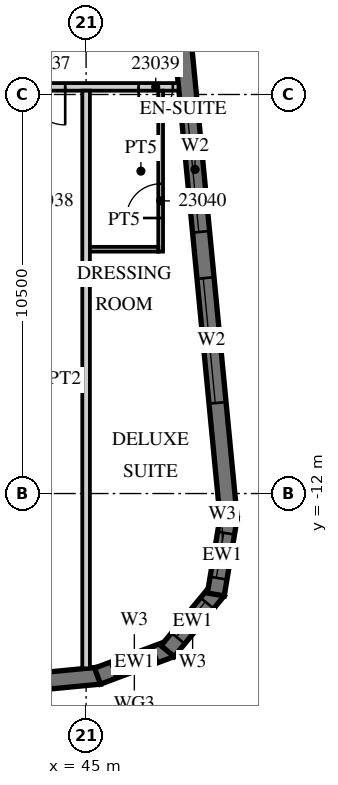
"""IFC4 building model, lengths in metres.
Left out: names, types, materials, properties, quantities, classifications, styles, units other than length and angle.
Written with IfcOpenShell. Run it as: python <this file> out.ifc"""

import sys

from ifc_helpers import new_model, si_unit, direction, frame, frame_2d, origin, place, context, subcontext, project, spatial, polyline, rectangle, outline, extrude, element, fill, save


model = new_model("IFC4")
c1 = context("Model", 3, precision=1e-05, world=origin(), true_north=direction((0.0, 1.0)))
c2 = subcontext(c1, "Body", "Model", "MODEL_VIEW")
j1 = project(units=[si_unit("LENGTHUNIT", "METRE"), si_unit("PLANEANGLEUNIT", "RADIAN")], contexts=[c1])
p1 = place(None, origin())
s1 = spatial("IfcSite", under=j1, at=p1, CompositionType="ELEMENT")
p2 = place(p1, origin())
s2 = spatial("IfcBuilding", under=s1, at=p2, CompositionType="ELEMENT")
p3 = place(p2, frame((0.0, 0.0, 110.8)))
s3 = spatial("IfcBuildingStorey", under=s2, at=p3, CompositionType="ELEMENT", Elevation=110.8)
p4 = place(p3, frame((-13.521, -22.46, 0.0), z_axis=(0.0, 0.0, 1.0), x_axis=(0.995396096335, 0.095846812164, 0.0)))
e1 = element("IfcWall", 1, at=p4, inside=s3, PredefinedType="SOLIDWALL", context=c2, shape_type="SweptSolid", body=[
    extrude(rectangle(XDim=59.151, YDim=0.45, at=frame_2d((29.575, 0.0))), origin(), (0.0, 0.0, 1.0), 3.02),
])
p5 = place(p4, frame((0.91, 0.0, 0.45)))
e2 = element("IfcOpeningElement", 2, at=p5, cuts=e1, PredefinedType="OPENING", context=c2, shape_type="SweptSolid", body=[
    extrude(rectangle(XDim=2.7, YDim=2.25, at=frame_2d((1.35, 1.125))), frame((0.0, 0.235, 0.0), z_axis=(0.0, -1.0, 0.0), x_axis=(1.0, 0.0, 0.0)), (0.0, 0.0, 1.0), 0.47),
])
p6 = place(p4, frame((5.431, 0.0, 0.45)))
e3 = element("IfcOpeningElement", 3, at=p6, cuts=e1, PredefinedType="OPENING", context=c2, shape_type="SweptSolid", body=[
    extrude(rectangle(XDim=2.7, YDim=2.25, at=frame_2d((1.35, 1.125))), frame((0.0, 0.235, 0.0), z_axis=(0.0, -1.0, 0.0), x_axis=(1.0, 0.0, 0.0)), (0.0, 0.0, 1.0), 0.47),
])
p7 = place(p4, frame((9.952, 0.0, 0.45)))
e4 = element("IfcOpeningElement", 4, at=p7, cuts=e1, PredefinedType="OPENING", context=c2, shape_type="SweptSolid", body=[
    extrude(rectangle(XDim=2.7, YDim=2.25, at=frame_2d((1.35, 1.125))), frame((0.0, 0.235, 0.0), z_axis=(0.0, -1.0, 0.0), x_axis=(1.0, 0.0, 0.0)), (0.0, 0.0, 1.0), 0.47),
])
p8 = place(p4, frame((14.473, 0.0, 0.45)))
e5 = element("IfcOpeningElement", 5, at=p8, cuts=e1, PredefinedType="OPENING", context=c2, shape_type="SweptSolid", body=[
    extrude(rectangle(XDim=2.7, YDim=2.25, at=frame_2d((1.35, 1.125))), frame((0.0, 0.235, 0.0), z_axis=(0.0, -1.0, 0.0), x_axis=(1.0, 0.0, 0.0)), (0.0, 0.0, 1.0), 0.47),
])
p9 = place(p4, frame((18.994, 0.0, 0.45)))
e6 = element("IfcOpeningElement", 6, at=p9, cuts=e1, PredefinedType="OPENING", context=c2, shape_type="SweptSolid", body=[
    extrude(rectangle(XDim=2.7, YDim=2.25, at=frame_2d((1.35, 1.125))), frame((0.0, 0.235, 0.0), z_axis=(0.0, -1.0, 0.0), x_axis=(1.0, 0.0, 0.0)), (0.0, 0.0, 1.0), 0.47),
])
p10 = place(p4, frame((23.514, 0.0, 0.45)))
e7 = element("IfcOpeningElement", 7, at=p10, cuts=e1, PredefinedType="OPENING", context=c2, shape_type="SweptSolid", body=[
    extrude(rectangle(XDim=2.7, YDim=2.25, at=frame_2d((1.35, 1.125))), frame((0.0, 0.235, 0.0), z_axis=(0.0, -1.0, 0.0), x_axis=(1.0, 0.0, 0.0)), (0.0, 0.0, 1.0), 0.47),
])
p11 = place(p4, frame((28.035, 0.0, 0.45)))
e8 = element("IfcOpeningElement", 8, at=p11, cuts=e1, PredefinedType="OPENING", context=c2, shape_type="SweptSolid", body=[
    extrude(rectangle(XDim=2.7, YDim=2.25, at=frame_2d((1.35, 1.125))), frame((0.0, 0.235, 0.0), z_axis=(0.0, -1.0, 0.0), x_axis=(1.0, 0.0, 0.0)), (0.0, 0.0, 1.0), 0.47),
])
p12 = place(p4, frame((32.556, 0.0, 0.45)))
e9 = element("IfcOpeningElement", 9, at=p12, cuts=e1, PredefinedType="OPENING", context=c2, shape_type="SweptSolid", body=[
    extrude(rectangle(XDim=2.7, YDim=2.25, at=frame_2d((1.35, 1.125))), frame((0.0, 0.235, 0.0), z_axis=(0.0, -1.0, 0.0), x_axis=(1.0, 0.0, 0.0)), (0.0, 0.0, 1.0), 0.47),
])
p13 = place(p4, frame((37.077, 0.0, 0.45)))
e10 = element("IfcOpeningElement", 10, at=p13, cuts=e1, PredefinedType="OPENING", context=c2, shape_type="SweptSolid", body=[
    extrude(rectangle(XDim=2.7, YDim=2.25, at=frame_2d((1.35, 1.125))), frame((0.0, 0.235, 0.0), z_axis=(0.0, -1.0, 0.0), x_axis=(1.0, 0.0, 0.0)), (0.0, 0.0, 1.0), 0.47),
])
p14 = place(p4, frame((41.598, 0.0, 0.45)))
e11 = element("IfcOpeningElement", 11, at=p14, cuts=e1, PredefinedType="OPENING", context=c2, shape_type="SweptSolid", body=[
    extrude(rectangle(XDim=2.7, YDim=2.25, at=frame_2d((1.35, 1.125))), frame((0.0, 0.235, 0.0), z_axis=(0.0, -1.0, 0.0), x_axis=(1.0, 0.0, 0.0)), (0.0, 0.0, 1.0), 0.47),
])
p15 = place(p4, frame((46.118, 0.0, 0.45)))
e12 = element("IfcOpeningElement", 12, at=p15, cuts=e1, PredefinedType="OPENING", context=c2, shape_type="SweptSolid", body=[
    extrude(rectangle(XDim=2.7, YDim=2.25, at=frame_2d((1.35, 1.125))), frame((0.0, 0.235, 0.0), z_axis=(0.0, -1.0, 0.0), x_axis=(1.0, 0.0, 0.0)), (0.0, 0.0, 1.0), 0.47),
])
p16 = place(p4, frame((50.639, 0.0, 0.45)))
e13 = element("IfcOpeningElement", 13, at=p16, cuts=e1, PredefinedType="OPENING", context=c2, shape_type="SweptSolid", body=[
    extrude(rectangle(XDim=2.7, YDim=2.25, at=frame_2d((1.35, 1.125))), frame((0.0, 0.235, 0.0), z_axis=(0.0, -1.0, 0.0), x_axis=(1.0, 0.0, 0.0)), (0.0, 0.0, 1.0), 0.47),
])
p17 = place(p4, frame((55.15, 0.0, 0.45)))
e14 = element("IfcOpeningElement", 14, at=p17, cuts=e1, PredefinedType="OPENING", context=c2, shape_type="SweptSolid", body=[
    extrude(rectangle(XDim=2.7, YDim=2.25, at=frame_2d((1.35, 1.125))), frame((0.0, 0.235, 0.0), z_axis=(0.0, -1.0, 0.0), x_axis=(1.0, 0.0, 0.0)), (0.0, 0.0, 1.0), 0.47),
])
p18 = place(p3, frame((45.3, -16.804, 0.0), z_axis=(0.0, 0.0, 1.0), x_axis=(0.936677599948, 0.350192909346, 0.0)))
e15 = element("IfcWall", 15, at=p18, inside=s3, PredefinedType="SOLIDWALL", context=c2, shape_type="SweptSolid", body=[
    extrude(outline(polyline([(0.0, -0.225), (2.071, -0.225), (1.95, 0.225), (0.121, 0.225), (0.0, -0.225)])), origin(), (0.0, 0.0, 1.0), 3.02),
])
p19 = place(p18, frame((0.435, 0.0, 0.45)))
e16 = element("IfcOpeningElement", 16, at=p19, cuts=e15, PredefinedType="OPENING", context=c2, shape_type="SweptSolid", body=[
    extrude(rectangle(XDim=1.2, YDim=2.25, at=frame_2d((0.6, 1.125))), frame((0.0, 0.235, 0.0), z_axis=(0.0, -1.0, 0.0), x_axis=(1.0, 0.0, 0.0)), (0.0, 0.0, 1.0), 0.47),
])
p20 = place(p3, frame((47.145, -16.147, 0.0), z_axis=(0.0, 0.0, 1.0), x_axis=(0.635988241739, 0.771698747161, 0.0)))
e17 = element("IfcWall", 17, at=p20, inside=s3, PredefinedType="SOLIDWALL", context=c2, shape_type="SweptSolid", body=[
    extrude(outline(polyline([(0.0, -0.225), (2.071, -0.225), (1.95, 0.225), (0.121, 0.225), (0.0, -0.225)])), origin(), (0.0, 0.0, 1.0), 3.02),
])
p21 = place(p20, frame((0.435, 0.0, 0.45)))
e18 = element("IfcOpeningElement", 18, at=p21, cuts=e17, PredefinedType="OPENING", context=c2, shape_type="SweptSolid", body=[
    extrude(rectangle(XDim=1.2, YDim=2.25, at=frame_2d((0.6, 1.125))), frame((0.0, 0.235, 0.0), z_axis=(0.0, -1.0, 0.0), x_axis=(1.0, 0.0, 0.0)), (0.0, 0.0, 1.0), 0.47),
])
p22 = place(p3, frame((48.413, -14.655, 0.0), z_axis=(0.0, 0.0, 1.0), x_axis=(0.165068144653, 0.986282164302, 0.0)))
e19 = element("IfcWall", 19, at=p22, inside=s3, PredefinedType="SOLIDWALL", context=c2, shape_type="SweptSolid", body=[
    extrude(outline(polyline([(0.0, -0.225), (2.071, -0.225), (1.95, 0.225), (0.121, 0.225), (0.0, -0.225)])), origin(), (0.0, 0.0, 1.0), 3.02),
])
p23 = place(p22, frame((0.435, 0.0, 0.45)))
e20 = element("IfcOpeningElement", 20, at=p23, cuts=e19, PredefinedType="OPENING", context=c2, shape_type="SweptSolid", body=[
    extrude(rectangle(XDim=1.2, YDim=2.25, at=frame_2d((0.6, 1.125))), frame((0.0, 0.235, 0.0), z_axis=(0.0, -1.0, 0.0), x_axis=(1.0, 0.0, 0.0)), (0.0, 0.0, 1.0), 0.47),
])
p24 = place(p3, frame((48.753, -12.672, 0.0), z_axis=(0.0, 0.0, 1.0), x_axis=(-0.095842661909, 0.995396495954, 0.0)))
e21 = element("IfcWall", 21, at=p24, inside=s3, PredefinedType="SOLIDWALL", context=c2, shape_type="SweptSolid", body=[
    extrude(rectangle(XDim=35.0, YDim=0.45, at=frame_2d((17.5, 0.0))), origin(), (0.0, 0.0, 1.0), 3.02),
])
p25 = place(p24, frame((3.072, 0.0, 0.45)))
e22 = element("IfcOpeningElement", 22, at=p25, cuts=e21, PredefinedType="OPENING", context=c2, shape_type="SweptSolid", body=[
    extrude(rectangle(XDim=3.3, YDim=2.25, at=frame_2d((1.65, 1.125))), frame((0.0, 0.235, 0.0), z_axis=(0.0, -1.0, 0.0), x_axis=(1.0, 0.0, 0.0)), (0.0, 0.0, 1.0), 0.47),
])
p26 = place(p24, frame((7.593, 0.0, 0.45)))
e23 = element("IfcOpeningElement", 23, at=p26, cuts=e21, PredefinedType="OPENING", context=c2, shape_type="SweptSolid", body=[
    extrude(rectangle(XDim=3.3, YDim=2.25, at=frame_2d((1.65, 1.125))), frame((0.0, 0.235, 0.0), z_axis=(0.0, -1.0, 0.0), x_axis=(1.0, 0.0, 0.0)), (0.0, 0.0, 1.0), 0.47),
])
p27 = place(p3, frame((-13.5, -1.3, 0.0), z_axis=(0.0, 0.0, 1.0), x_axis=(1.0, 0.0, 0.0)))
e24 = element("IfcWall", 24, at=p27, inside=s3, PredefinedType="PARTITIONING", context=c2, shape_type="SweptSolid", body=[
    extrude(rectangle(XDim=60.932, YDim=0.2, at=frame_2d((30.466, 0.0))), origin(), (0.0, 0.0, 1.0), 3.02),
])
p28 = place(p27, frame((0.575, 0.0, 0.0)))
e25 = element("IfcOpeningElement", 25, at=p28, cuts=e24, PredefinedType="OPENING", context=c2, shape_type="SweptSolid", body=[
    extrude(rectangle(XDim=1.0, YDim=2.1, at=frame_2d((0.5, 1.05))), frame((0.0, 0.11, 0.0), z_axis=(0.0, -1.0, 0.0), x_axis=(1.0, 0.0, 0.0)), (0.0, 0.0, 1.0), 0.22),
])
p29 = place(p27, frame((5.075, 0.0, 0.0)))
e26 = element("IfcOpeningElement", 26, at=p29, cuts=e24, PredefinedType="OPENING", context=c2, shape_type="SweptSolid", body=[
    extrude(rectangle(XDim=1.0, YDim=2.1, at=frame_2d((0.5, 1.05))), frame((0.0, 0.11, 0.0), z_axis=(0.0, -1.0, 0.0), x_axis=(1.0, 0.0, 0.0)), (0.0, 0.0, 1.0), 0.22),
])
p30 = place(p27, frame((11.925, 0.0, 0.0)))
e27 = element("IfcOpeningElement", 27, at=p30, cuts=e24, PredefinedType="OPENING", context=c2, shape_type="SweptSolid", body=[
    extrude(rectangle(XDim=1.0, YDim=2.1, at=frame_2d((0.5, 1.05))), frame((0.0, 0.11, 0.0), z_axis=(0.0, -1.0, 0.0), x_axis=(1.0, 0.0, 0.0)), (0.0, 0.0, 1.0), 0.22),
])
p31 = place(p27, frame((15.938, 0.0, 0.0)))
e28 = element("IfcOpeningElement", 28, at=p31, cuts=e24, PredefinedType="OPENING", context=c2, shape_type="SweptSolid", body=[
    extrude(rectangle(XDim=1.2, YDim=2.1, at=frame_2d((0.6, 1.05))), frame((0.0, 0.11, 0.0), z_axis=(0.0, -1.0, 0.0), x_axis=(1.0, 0.0, 0.0)), (0.0, 0.0, 1.0), 0.22),
])
p32 = place(p27, frame((25.45, 0.0, 0.0)))
e29 = element("IfcOpeningElement", 29, at=p32, cuts=e24, PredefinedType="OPENING", context=c2, shape_type="SweptSolid", body=[
    extrude(rectangle(XDim=1.0, YDim=2.1, at=frame_2d((0.5, 1.05))), frame((0.0, 0.11, 0.0), z_axis=(0.0, -1.0, 0.0), x_axis=(1.0, 0.0, 0.0)), (0.0, 0.0, 1.0), 0.22),
])
p33 = place(p27, frame((27.55, 0.0, 0.0)))
e30 = element("IfcOpeningElement", 30, at=p33, cuts=e24, PredefinedType="OPENING", context=c2, shape_type="SweptSolid", body=[
    extrude(rectangle(XDim=1.0, YDim=2.1, at=frame_2d((0.5, 1.05))), frame((0.0, 0.11, 0.0), z_axis=(0.0, -1.0, 0.0), x_axis=(1.0, 0.0, 0.0)), (0.0, 0.0, 1.0), 0.22),
])
p34 = place(p27, frame((33.938, 0.0, 0.0)))
e31 = element("IfcOpeningElement", 31, at=p34, cuts=e24, PredefinedType="OPENING", context=c2, shape_type="SweptSolid", body=[
    extrude(rectangle(XDim=1.2, YDim=2.1, at=frame_2d((0.6, 1.05))), frame((0.0, 0.11, 0.0), z_axis=(0.0, -1.0, 0.0), x_axis=(1.0, 0.0, 0.0)), (0.0, 0.0, 1.0), 0.22),
])
p35 = place(p27, frame((45.862, 0.0, 0.0)))
e32 = element("IfcOpeningElement", 32, at=p35, cuts=e24, PredefinedType="OPENING", context=c2, shape_type="SweptSolid", body=[
    extrude(rectangle(XDim=1.2, YDim=2.1, at=frame_2d((0.6, 1.05))), frame((0.0, 0.11, 0.0), z_axis=(0.0, -1.0, 0.0), x_axis=(1.0, 0.0, 0.0)), (0.0, 0.0, 1.0), 0.22),
])
p36 = place(p27, frame((52.425, 0.0, 0.0)))
e33 = element("IfcOpeningElement", 33, at=p36, cuts=e24, PredefinedType="OPENING", context=c2, shape_type="SweptSolid", body=[
    extrude(rectangle(XDim=1.0, YDim=2.1, at=frame_2d((0.5, 1.05))), frame((0.0, 0.11, 0.0), z_axis=(0.0, -1.0, 0.0), x_axis=(1.0, 0.0, 0.0)), (0.0, 0.0, 1.0), 0.22),
])
p37 = place(p27, frame((56.95, 0.0, 0.0)))
e34 = element("IfcOpeningElement", 34, at=p37, cuts=e24, PredefinedType="OPENING", context=c2, shape_type="SweptSolid", body=[
    extrude(rectangle(XDim=1.0, YDim=2.1, at=frame_2d((0.5, 1.05))), frame((0.0, 0.11, 0.0), z_axis=(0.0, -1.0, 0.0), x_axis=(1.0, 0.0, 0.0)), (0.0, 0.0, 1.0), 0.22),
])
p38 = place(p27, frame((59.882, 0.0, 0.0)))
e35 = element("IfcOpeningElement", 35, at=p38, cuts=e24, PredefinedType="OPENING", context=c2, shape_type="SweptSolid", body=[
    extrude(rectangle(XDim=0.9, YDim=2.1, at=frame_2d((0.45, 1.05))), frame((0.0, 0.11, 0.0), z_axis=(0.0, -1.0, 0.0), x_axis=(1.0, 0.0, 0.0)), (0.0, 0.0, 1.0), 0.22),
])
p39 = place(p3, frame((45.0, -16.599, 0.0), z_axis=(0.0, 0.0, 1.0), x_axis=(0.0, 1.0, 0.0)))
e36 = element("IfcWall", 36, at=p39, inside=s3, PredefinedType="PARTITIONING", context=c2, shape_type="SweptSolid", body=[
    extrude(rectangle(XDim=15.199, YDim=0.2, at=frame_2d((7.6, 0.0))), origin(), (0.0, 0.0, 1.0), 3.02),
])
p40 = place(p3, frame((46.962, -5.634, 0.0), z_axis=(0.0, 0.0, 1.0), x_axis=(0.0, 1.0, 0.0)))
e37 = element("IfcWall", 37, at=p40, inside=s3, PredefinedType="PARTITIONING", context=c2, shape_type="SweptSolid", body=[
    extrude(rectangle(XDim=4.234, YDim=0.125, at=frame_2d((2.117, 0.0))), origin(), (0.0, 0.0, 1.0), 3.02),
])
p41 = place(p40, frame((0.884, 0.0, 0.0)))
e38 = element("IfcOpeningElement", 38, at=p41, cuts=e37, PredefinedType="OPENING", context=c2, shape_type="SweptSolid", body=[
    extrude(rectangle(XDim=0.9, YDim=2.1, at=frame_2d((0.45, 1.05))), frame((0.0, 0.073, 0.0), z_axis=(0.0, -1.0, 0.0), x_axis=(1.0, 0.0, 0.0)), (0.0, 0.0, 1.0), 0.145),
])
p42 = place(p3, frame((45.1, -5.572, 0.0), z_axis=(0.0, 0.0, 1.0), x_axis=(1.0, 0.0, 0.0)))
e39 = element("IfcWall", 39, at=p42, inside=s3, PredefinedType="PARTITIONING", context=c2, shape_type="SweptSolid", body=[
    extrude(rectangle(XDim=1.8, YDim=0.125, at=frame_2d((0.9, 0.0))), origin(), (0.0, 0.0, 1.0), 3.02),
])
p43 = place(p19, origin())
e40 = element("IfcWindow", 40, at=p43, inside=s3, PartitioningType="SINGLE_PANEL", PredefinedType="WINDOW", context=c2, shape_type="SweptSolid", body=[
    extrude(rectangle(XDim=1.2, YDim=2.25, at=frame_2d((0.6, 1.125))), frame((0.0, 0.09, 0.0), z_axis=(0.0, -1.0, 0.0), x_axis=(1.0, 0.0, 0.0)), (0.0, 0.0, 1.0), 0.06),
])
fill(e16, e40)
p44 = place(p21, origin())
e41 = element("IfcWindow", 41, at=p44, inside=s3, PartitioningType="SINGLE_PANEL", PredefinedType="WINDOW", context=c2, shape_type="SweptSolid", body=[
    extrude(rectangle(XDim=1.2, YDim=2.25, at=frame_2d((0.6, 1.125))), frame((0.0, 0.09, 0.0), z_axis=(0.0, -1.0, 0.0), x_axis=(1.0, 0.0, 0.0)), (0.0, 0.0, 1.0), 0.06),
])
fill(e18, e41)
p45 = place(p23, origin())
e42 = element("IfcWindow", 42, at=p45, inside=s3, PartitioningType="SINGLE_PANEL", PredefinedType="WINDOW", context=c2, shape_type="SweptSolid", body=[
    extrude(rectangle(XDim=1.2, YDim=2.25, at=frame_2d((0.6, 1.125))), frame((0.0, 0.09, 0.0), z_axis=(0.0, -1.0, 0.0), x_axis=(1.0, 0.0, 0.0)), (0.0, 0.0, 1.0), 0.06),
])
fill(e20, e42)
p46 = place(p25, origin())
e43 = element("IfcWindow", 43, at=p46, inside=s3, PartitioningType="SINGLE_PANEL", PredefinedType="WINDOW", context=c2, shape_type="SweptSolid", body=[
    extrude(rectangle(XDim=3.3, YDim=2.25, at=frame_2d((1.65, 1.125))), frame((0.0, 0.09, 0.0), z_axis=(0.0, -1.0, 0.0), x_axis=(1.0, 0.0, 0.0)), (0.0, 0.0, 1.0), 0.06),
])
fill(e22, e43)
p47 = place(p26, origin())
e44 = element("IfcWindow", 44, at=p47, inside=s3, PartitioningType="SINGLE_PANEL", PredefinedType="WINDOW", context=c2, shape_type="SweptSolid", body=[
    extrude(rectangle(XDim=3.3, YDim=2.25, at=frame_2d((1.65, 1.125))), frame((0.0, 0.09, 0.0), z_axis=(0.0, -1.0, 0.0), x_axis=(1.0, 0.0, 0.0)), (0.0, 0.0, 1.0), 0.06),
])
fill(e23, e44)
p48 = place(p37, origin())
e45 = element("IfcDoor", 45, at=p48, inside=s3, OperationType="SINGLE_SWING_RIGHT", PredefinedType="DOOR", context=c2, shape_type="SweptSolid", body=[
    extrude(rectangle(XDim=1.0, YDim=2.1, at=frame_2d((0.5, 1.05))), frame((0.0, 0.025, 0.0), z_axis=(0.0, -1.0, 0.0), x_axis=(1.0, 0.0, 0.0)), (0.0, 0.0, 1.0), 0.05),
])
fill(e34, e45)
p49 = place(p38, origin())
e46 = element("IfcDoor", 46, at=p49, inside=s3, OperationType="SINGLE_SWING_LEFT", PredefinedType="DOOR", context=c2, shape_type="SweptSolid", body=[
    extrude(rectangle(XDim=0.9, YDim=2.1, at=frame_2d((0.45, 1.05))), frame((0.0, 0.025, 0.0), z_axis=(0.0, -1.0, 0.0), x_axis=(1.0, 0.0, 0.0)), (0.0, 0.0, 1.0), 0.05),
])
fill(e35, e46)
p50 = place(p41, origin())
e47 = element("IfcDoor", 47, at=p50, inside=s3, OperationType="SINGLE_SWING_LEFT", PredefinedType="DOOR", context=c2, shape_type="SweptSolid", body=[
    extrude(rectangle(XDim=0.9, YDim=2.1, at=frame_2d((0.45, 1.05))), frame((0.0, 0.025, 0.0), z_axis=(0.0, -1.0, 0.0), x_axis=(1.0, 0.0, 0.0)), (0.0, 0.0, 1.0), 0.05),
])
fill(e38, e47)
save(model, sys.argv[1])
